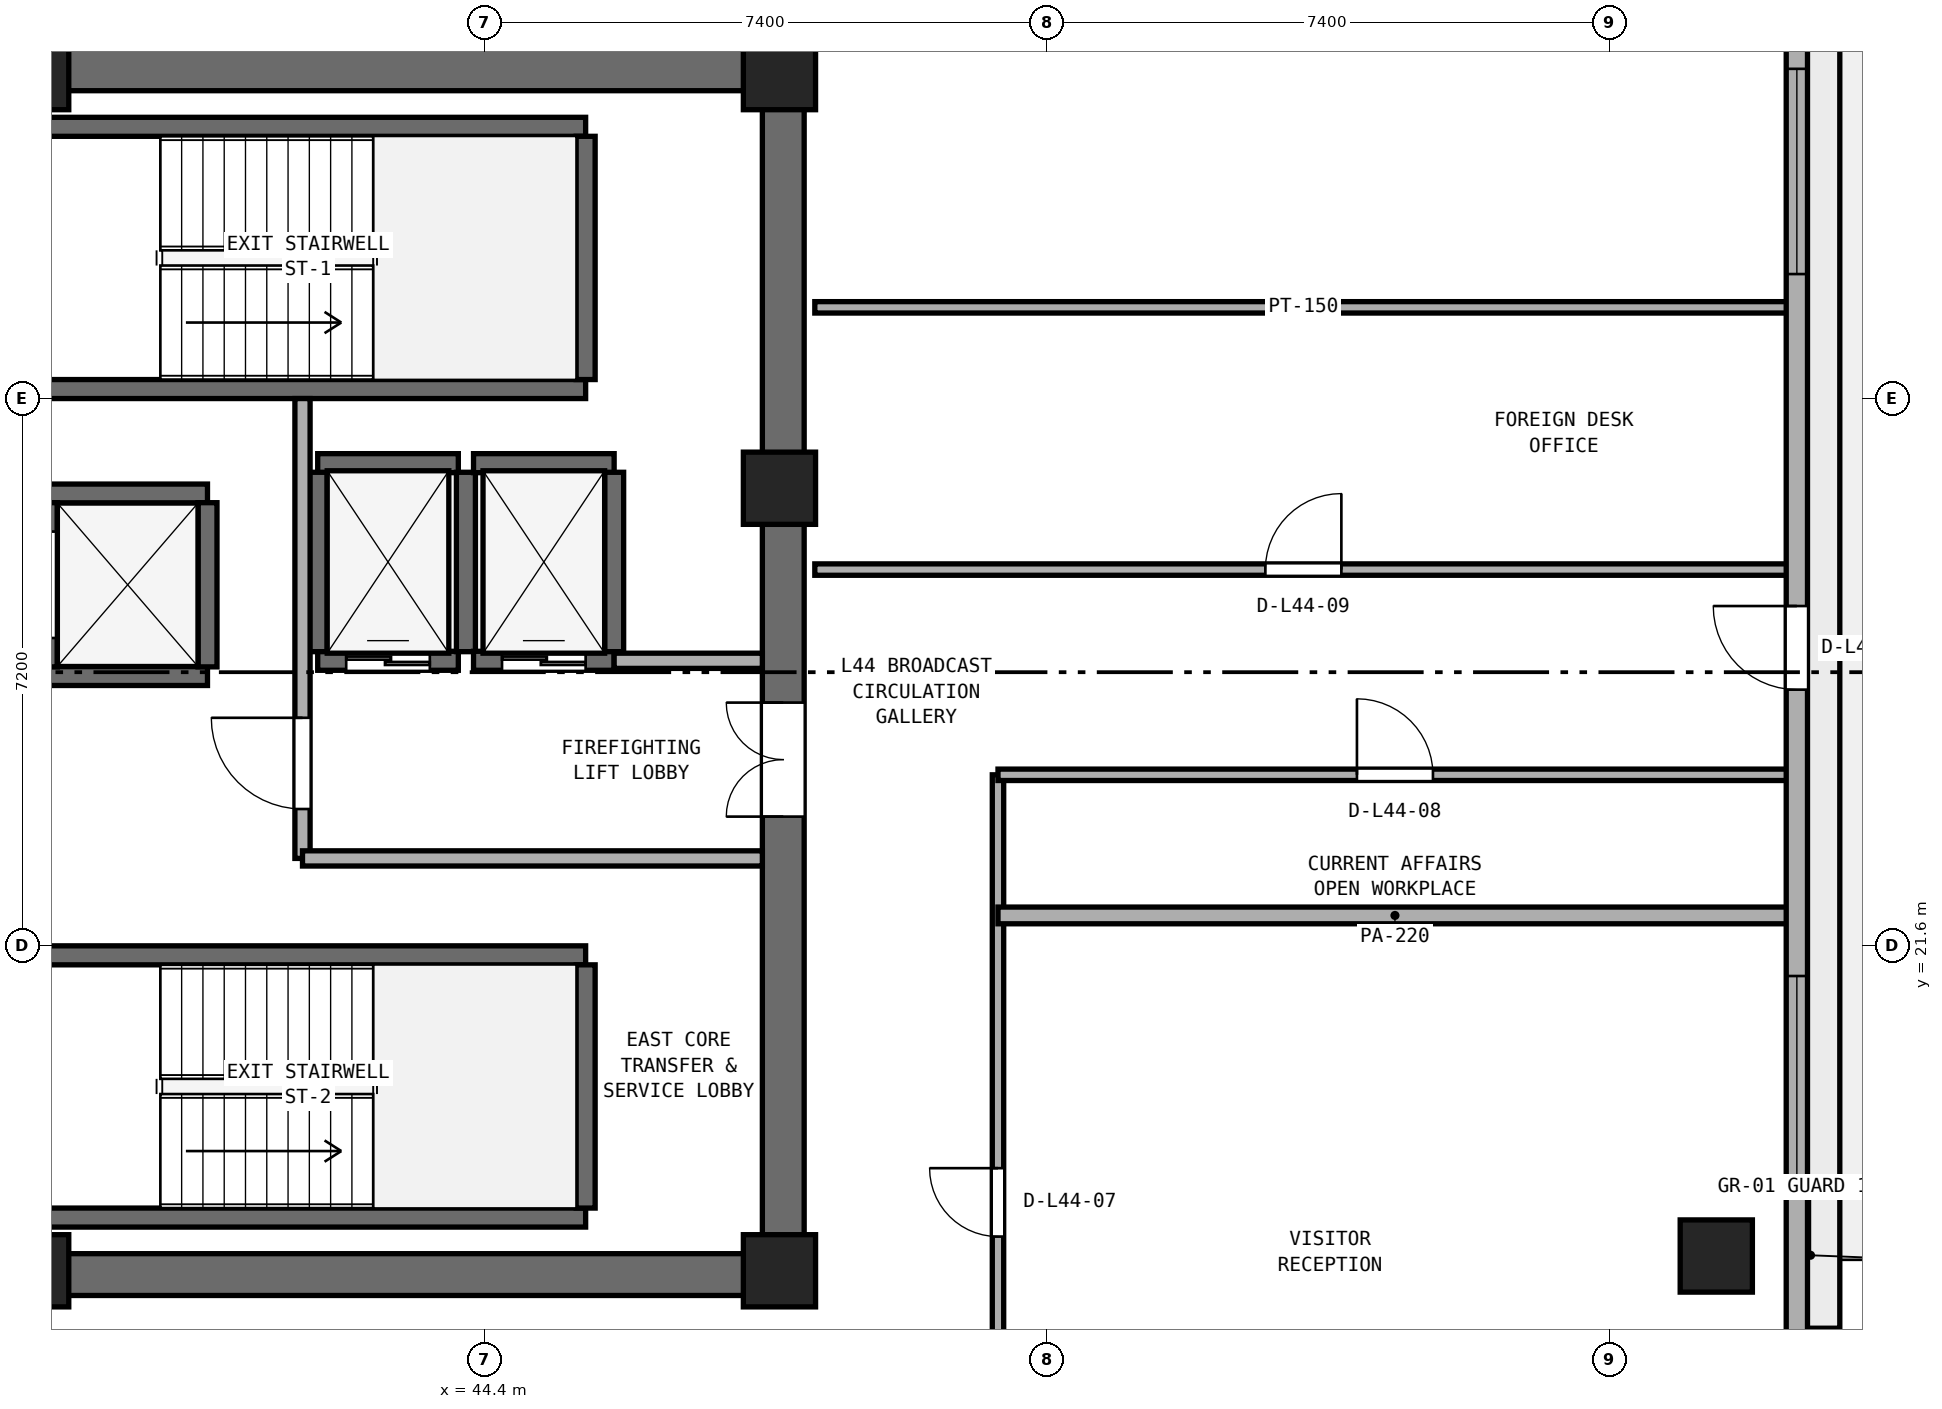
"""IFC4 building model, lengths in metres.
Left out: names, types, materials, properties, quantities, classifications, styles, units other than length and angle.
Written with IfcOpenShell. Run it as: python <this file> out.ifc"""

import sys

from ifc_helpers import new_model, si_unit, direction, frame, frame_2d, origin, origin_2d, place, context, subcontext, project, spatial, rectangle, extrude, element, fill, save


model = new_model("IFC4")
c1 = context("Model", 3, precision=1e-05, world=origin(), true_north=direction((0.0, 1.0)))
c2 = subcontext(c1, "Body", "Model", "MODEL_VIEW")
j1 = project(units=[si_unit("LENGTHUNIT", "METRE"), si_unit("PLANEANGLEUNIT", "RADIAN")], contexts=[c1])
p1 = place(None, origin())
s1 = spatial("IfcSite", under=j1, at=p1, CompositionType="ELEMENT")
p2 = place(p1, origin())
s2 = spatial("IfcBuilding", under=s1, at=p2, CompositionType="ELEMENT")
p3 = place(p2, frame((0.0, 0.0, 174.4)))
s3 = spatial("IfcBuildingStorey", under=s2, at=p3, CompositionType="ELEMENT", Elevation=174.4)
for number, where, z_axis, x_axis in (
    (1, (25.4, 17.275, 0.0), (0.0, 0.0, 1.0), (1.0, 0.0, 0.0)),
    (2, (25.4, 33.125, 0.0), (0.0, 0.0, 1.0), (1.0, 0.0, 0.0)),
):
    element("IfcWall", number, at=place(p3, frame(where, z_axis=z_axis, x_axis=x_axis)), inside=s3, PredefinedType="SHEAR", context=c2, shape_type="SweptSolid", body=[
        extrude(rectangle(XDim=23.2, YDim=0.55, at=frame_2d((11.6, 0.0))), origin(), (0.0, 0.0, 1.0), 3.54),
    ])
p4 = place(p3, frame((48.325, 17.55, 0.0), z_axis=(0.0, 0.0, 1.0), x_axis=(0.0, 1.0, 0.0)))
e3 = element("IfcWall", 3, at=p4, inside=s3, PredefinedType="SHEAR", context=c2, shape_type="SweptSolid", body=[
    extrude(rectangle(XDim=15.3, YDim=0.55, at=frame_2d((7.65, 0.0))), origin(), (0.0, 0.0, 1.0), 3.54),
])
p5 = place(p4, frame((5.75, 0.0, 0.0)))
e4 = element("IfcOpeningElement", 4, at=p5, cuts=e3, PredefinedType="OPENING", context=c2, shape_type="SweptSolid", body=[
    extrude(rectangle(XDim=1.5, YDim=2.15, at=frame_2d((0.75, 1.075))), frame((0.0, 0.285, 0.0), z_axis=(0.0, -1.0, 0.0), x_axis=(1.0, 0.0, 0.0)), (0.0, 0.0, 1.0), 0.57),
])
for number, where, z_axis, x_axis in (
    (5, (38.45, 17.325, 0.0), (0.0, 0.0, 1.0), (1.0, 0.0, 0.0)),
    (6, (48.275, 17.325, 0.0), (0.0, 0.0, 1.0), (1.0, 0.0, 0.0)),
    (7, (48.275, 27.62, 0.0), (0.0, 0.0, 1.0), (1.0, 0.0, 0.0)),
    (8, (48.275, 33.075, 0.0), (0.0, 0.0, 1.0), (1.0, 0.0, 0.0)),
    (9, (38.45, 33.075, 0.0), (0.0, 0.0, 1.0), (1.0, 0.0, 0.0)),
):
    element("IfcColumn", number, at=place(p3, frame(where, z_axis=z_axis, x_axis=x_axis)), inside=s3, PredefinedType="PILASTER", context=c2, shape_type="SweptSolid", body=[
        extrude(rectangle(XDim=0.95, YDim=0.95, at=origin_2d()), origin(), (0.0, 0.0, 1.0), 3.8),
    ])
p6 = place(p3, frame((60.6, 17.519, 0.0), z_axis=(0.0, 0.0, 1.0), x_axis=(1.0, 0.0, 0.0)))
e10 = element("IfcColumn", 10, at=p6, inside=s3, PredefinedType="COLUMN", context=c2, shape_type="SweptSolid", body=[
    extrude(rectangle(XDim=0.95, YDim=0.95, at=origin_2d()), origin(), (0.0, 0.0, 1.0), 3.8),
])
for number, where, z_axis, x_axis in (
    (11, (38.425, 28.925, 0.0), (0.0, 0.0, 1.0), (1.0, 0.0, 0.0)),
    (12, (38.425, 32.375, 0.0), (0.0, 0.0, 1.0), (1.0, 0.0, 0.0)),
):
    element("IfcWall", number, at=place(p3, frame(where, z_axis=z_axis, x_axis=x_axis)), inside=s3, PredefinedType="SHEAR", context=c2, shape_type="SweptSolid", body=[
        extrude(rectangle(XDim=7.3, YDim=0.25, at=frame_2d((3.65, 0.0))), origin(), (0.0, 0.0, 1.0), 3.54),
    ])
p7 = place(p3, frame((45.725, 29.05, 0.0), z_axis=(0.0, 0.0, 1.0), x_axis=(0.0, 1.0, 0.0)))
e13 = element("IfcWall", 13, at=p7, inside=s3, PredefinedType="SHEAR", context=c2, shape_type="SweptSolid", body=[
    extrude(rectangle(XDim=3.2, YDim=0.25, at=frame_2d((1.6, 0.0))), origin(), (0.0, 0.0, 1.0), 3.54),
])
for number, where, z_axis, x_axis in (
    (14, (38.425, 18.025, 0.0), (0.0, 0.0, 1.0), (1.0, 0.0, 0.0)),
    (15, (38.425, 21.475, 0.0), (0.0, 0.0, 1.0), (1.0, 0.0, 0.0)),
):
    element("IfcWall", number, at=place(p3, frame(where, z_axis=z_axis, x_axis=x_axis)), inside=s3, PredefinedType="SHEAR", context=c2, shape_type="SweptSolid", body=[
        extrude(rectangle(XDim=7.3, YDim=0.25, at=frame_2d((3.65, 0.0))), origin(), (0.0, 0.0, 1.0), 3.54),
    ])
p8 = place(p3, frame((45.725, 18.15, 0.0), z_axis=(0.0, 0.0, 1.0), x_axis=(0.0, 1.0, 0.0)))
e16 = element("IfcWall", 16, at=p8, inside=s3, PredefinedType="SHEAR", context=c2, shape_type="SweptSolid", body=[
    extrude(rectangle(XDim=3.2, YDim=0.25, at=frame_2d((1.6, 0.0))), origin(), (0.0, 0.0, 1.0), 3.54),
])
p9 = place(p3, frame((42.2, 25.35, 0.0), z_axis=(0.0, 0.0, 1.0), x_axis=(1.0, 0.0, 0.0)))
e17 = element("IfcWall", 17, at=p9, inside=s3, PredefinedType="SHEAR", context=c2, shape_type="SweptSolid", body=[
    extrude(rectangle(XDim=1.85, YDim=0.25, at=frame_2d((0.925, 0.0))), origin(), (0.0, 0.0, 1.0), 3.54),
])
p10 = place(p9, frame((0.375, 0.0, 0.0)))
e18 = element("IfcOpeningElement", 18, at=p10, cuts=e17, PredefinedType="OPENING", context=c2, shape_type="SweptSolid", body=[
    extrude(rectangle(XDim=1.1, YDim=2.15, at=frame_2d((0.55, 1.075))), frame((0.0, 0.135, 0.0), z_axis=(0.0, -1.0, 0.0), x_axis=(1.0, 0.0, 0.0)), (0.0, 0.0, 1.0), 0.27),
])
p11 = place(p3, frame((42.2, 27.95, 0.0), z_axis=(0.0, 0.0, 1.0), x_axis=(1.0, 0.0, 0.0)))
e19 = element("IfcWall", 19, at=p11, inside=s3, PredefinedType="SHEAR", context=c2, shape_type="SweptSolid", body=[
    extrude(rectangle(XDim=1.85, YDim=0.25, at=frame_2d((0.925, 0.0))), origin(), (0.0, 0.0, 1.0), 3.54),
])
for number, where, z_axis, x_axis in (
    (20, (42.2, 25.47, 0.0), (0.0, 0.0, 1.0), (0.0, 1.0, 0.0)),
    (21, (44.15, 25.47, 0.0), (0.0, 0.0, 1.0), (0.0, 1.0, 0.0)),
):
    element("IfcWall", number, at=place(p3, frame(where, z_axis=z_axis, x_axis=x_axis)), inside=s3, PredefinedType="SHEAR", context=c2, shape_type="SweptSolid", body=[
        extrude(rectangle(XDim=2.36, YDim=0.25, at=frame_2d((1.18, 0.0))), origin(), (0.0, 0.0, 1.0), 3.54),
    ])
p12 = place(p3, frame((44.25, 25.35, 0.0), z_axis=(0.0, 0.0, 1.0), x_axis=(1.0, 0.0, 0.0)))
e22 = element("IfcWall", 22, at=p12, inside=s3, PredefinedType="SHEAR", context=c2, shape_type="SweptSolid", body=[
    extrude(rectangle(XDim=1.85, YDim=0.25, at=frame_2d((0.925, 0.0))), origin(), (0.0, 0.0, 1.0), 3.54),
])
p13 = place(p12, frame((0.375, 0.0, 0.0)))
e23 = element("IfcOpeningElement", 23, at=p13, cuts=e22, PredefinedType="OPENING", context=c2, shape_type="SweptSolid", body=[
    extrude(rectangle(XDim=1.1, YDim=2.15, at=frame_2d((0.55, 1.075))), frame((0.0, 0.135, 0.0), z_axis=(0.0, -1.0, 0.0), x_axis=(1.0, 0.0, 0.0)), (0.0, 0.0, 1.0), 0.27),
])
p14 = place(p3, frame((44.25, 27.95, 0.0), z_axis=(0.0, 0.0, 1.0), x_axis=(1.0, 0.0, 0.0)))
e24 = element("IfcWall", 24, at=p14, inside=s3, PredefinedType="SHEAR", context=c2, shape_type="SweptSolid", body=[
    extrude(rectangle(XDim=1.85, YDim=0.25, at=frame_2d((0.925, 0.0))), origin(), (0.0, 0.0, 1.0), 3.54),
])
p15 = place(p3, frame((46.1, 25.47, 0.0), z_axis=(0.0, 0.0, 1.0), x_axis=(0.0, 1.0, 0.0)))
e25 = element("IfcWall", 25, at=p15, inside=s3, PredefinedType="SHEAR", context=c2, shape_type="SweptSolid", body=[
    extrude(rectangle(XDim=2.36, YDim=0.25, at=frame_2d((1.18, 0.0))), origin(), (0.0, 0.0, 1.0), 3.54),
])
for number, where, z_axis, x_axis in (
    (26, (38.65, 25.15, 0.0), (0.0, 0.0, 1.0), (1.0, 0.0, 0.0)),
    (27, (38.65, 27.55, 0.0), (0.0, 0.0, 1.0), (1.0, 0.0, 0.0)),
):
    element("IfcWall", number, at=place(p3, frame(where, z_axis=z_axis, x_axis=x_axis)), inside=s3, PredefinedType="SHEAR", context=c2, shape_type="SweptSolid", body=[
        extrude(rectangle(XDim=2.1, YDim=0.25, at=frame_2d((1.05, 0.0))), origin(), (0.0, 0.0, 1.0), 3.54),
    ])
p16 = place(p3, frame((38.65, 25.27, 0.0), z_axis=(0.0, 0.0, 1.0), x_axis=(0.0, 1.0, 0.0)))
e28 = element("IfcWall", 28, at=p16, inside=s3, PredefinedType="SHEAR", context=c2, shape_type="SweptSolid", body=[
    extrude(rectangle(XDim=2.16, YDim=0.25, at=frame_2d((1.08, 0.0))), origin(), (0.0, 0.0, 1.0), 3.54),
])
p17 = place(p16, frame((0.38, 0.0, 0.0)))
e29 = element("IfcOpeningElement", 29, at=p17, cuts=e28, PredefinedType="OPENING", context=c2, shape_type="SweptSolid", body=[
    extrude(rectangle(XDim=1.4, YDim=2.2, at=frame_2d((0.7, 1.1))), frame((0.0, 0.135, 0.0), z_axis=(0.0, -1.0, 0.0), x_axis=(1.0, 0.0, 0.0)), (0.0, 0.0, 1.0), 0.27),
])
p18 = place(p3, frame((40.75, 25.27, 0.0), z_axis=(0.0, 0.0, 1.0), x_axis=(0.0, 1.0, 0.0)))
e30 = element("IfcWall", 30, at=p18, inside=s3, PredefinedType="SHEAR", context=c2, shape_type="SweptSolid", body=[
    extrude(rectangle(XDim=2.16, YDim=0.25, at=frame_2d((1.08, 0.0))), origin(), (0.0, 0.0, 1.0), 3.54),
])
p19 = place(p3, frame((42.0, 22.75, 0.0), z_axis=(0.0, 0.0, 1.0), x_axis=(0.0, 1.0, 0.0)))
e31 = element("IfcWall", 31, at=p19, inside=s3, PredefinedType="SOLIDWALL", context=c2, shape_type="SweptSolid", body=[
    extrude(rectangle(XDim=6.05, YDim=0.2, at=frame_2d((3.025, 0.0))), origin(), (0.0, 0.0, 1.0), 3.54),
])
p20 = place(p19, frame((0.65, 0.0, 0.0)))
e32 = element("IfcOpeningElement", 32, at=p20, cuts=e31, PredefinedType="OPENING", context=c2, shape_type="SweptSolid", body=[
    extrude(rectangle(XDim=1.2, YDim=2.15, at=frame_2d((0.6, 1.075))), frame((0.0, 0.11, 0.0), z_axis=(0.0, -1.0, 0.0), x_axis=(1.0, 0.0, 0.0)), (0.0, 0.0, 1.0), 0.22),
])
p21 = place(p3, frame((42.0, 22.75, 0.0), z_axis=(0.0, 0.0, 1.0), x_axis=(1.0, 0.0, 0.0)))
e33 = element("IfcWall", 33, at=p21, inside=s3, PredefinedType="SOLIDWALL", context=c2, shape_type="SweptSolid", body=[
    extrude(rectangle(XDim=6.05, YDim=0.2, at=frame_2d((3.025, 0.0))), origin(), (0.0, 0.0, 1.0), 3.54),
])
p22 = place(p3, frame((46.1, 25.35, 0.0), z_axis=(0.0, 0.0, 1.0), x_axis=(1.0, 0.0, 0.0)))
e34 = element("IfcWall", 34, at=p22, inside=s3, PredefinedType="SOLIDWALL", context=c2, shape_type="SweptSolid", body=[
    extrude(rectangle(XDim=1.95, YDim=0.2, at=frame_2d((0.975, 0.0))), origin(), (0.0, 0.0, 1.0), 3.54),
])
p23 = place(p3, frame((51.15, 5.736, 0.0), z_axis=(0.0, 0.0, 1.0), x_axis=(0.0, 1.0, 0.0)))
e35 = element("IfcWall", 35, at=p23, inside=s3, PredefinedType="PARTITIONING", context=c2, shape_type="SweptSolid", body=[
    extrude(rectangle(XDim=18.114, YDim=0.15, at=frame_2d((9.057, 0.0))), origin(), (0.0, 0.0, 1.0), 3.54),
])
p24 = place(p23, frame((12.039, 0.0, 0.0)))
e36 = element("IfcOpeningElement", 36, at=p24, cuts=e35, PredefinedType="OPENING", context=c2, shape_type="SweptSolid", body=[
    extrude(rectangle(XDim=0.9, YDim=2.1, at=frame_2d((0.45, 1.05))), frame((0.0, 0.085, 0.0), z_axis=(0.0, -1.0, 0.0), x_axis=(1.0, 0.0, 0.0)), (0.0, 0.0, 1.0), 0.17),
])
p25 = place(p3, frame((51.15, 22.0, 0.0), z_axis=(0.0, 0.0, 1.0), x_axis=(1.0, 0.0, 0.0)))
e37 = element("IfcWall", 37, at=p25, inside=s3, PredefinedType="PARTITIONING", context=c2, shape_type="SweptSolid", body=[
    extrude(rectangle(XDim=10.445, YDim=0.22, at=frame_2d((5.223, 0.0))), origin(), (0.0, 0.0, 1.0), 3.54),
])
p26 = place(p3, frame((51.15, 23.85, 0.0), z_axis=(0.0, 0.0, 1.0), x_axis=(1.0, 0.0, 0.0)))
e38 = element("IfcWall", 38, at=p26, inside=s3, PredefinedType="PARTITIONING", context=c2, shape_type="SweptSolid", body=[
    extrude(rectangle(XDim=10.445, YDim=0.15, at=frame_2d((5.223, 0.0))), origin(), (0.0, 0.0, 1.0), 3.54),
])
p27 = place(p26, frame((4.722, 0.0, 0.0)))
e39 = element("IfcOpeningElement", 39, at=p27, cuts=e38, PredefinedType="OPENING", context=c2, shape_type="SweptSolid", body=[
    extrude(rectangle(XDim=1.0, YDim=2.12, at=frame_2d((0.5, 1.06))), frame((0.0, 0.085, 0.0), z_axis=(0.0, -1.0, 0.0), x_axis=(1.0, 0.0, 0.0)), (0.0, 0.0, 1.0), 0.17),
])
p28 = place(p3, frame((48.74, 26.55, 0.0), z_axis=(0.0, 0.0, 1.0), x_axis=(1.0, 0.0, 0.0)))
e40 = element("IfcWall", 40, at=p28, inside=s3, PredefinedType="PARTITIONING", context=c2, shape_type="SweptSolid", body=[
    extrude(rectangle(XDim=12.855, YDim=0.15, at=frame_2d((6.427, 0.0))), origin(), (0.0, 0.0, 1.0), 3.54),
])
p29 = place(p28, frame((5.927, 0.0, 0.0)))
e41 = element("IfcOpeningElement", 41, at=p29, cuts=e40, PredefinedType="OPENING", context=c2, shape_type="SweptSolid", body=[
    extrude(rectangle(XDim=1.0, YDim=2.12, at=frame_2d((0.5, 1.06))), frame((0.0, 0.085, 0.0), z_axis=(0.0, -1.0, 0.0), x_axis=(1.0, 0.0, 0.0)), (0.0, 0.0, 1.0), 0.17),
])
p30 = place(p3, frame((48.74, 30.0, 0.0), z_axis=(0.0, 0.0, 1.0), x_axis=(1.0, 0.0, 0.0)))
e42 = element("IfcWall", 42, at=p30, inside=s3, PredefinedType="PARTITIONING", context=c2, shape_type="SweptSolid", body=[
    extrude(rectangle(XDim=12.855, YDim=0.15, at=frame_2d((6.427, 0.0))), origin(), (0.0, 0.0, 1.0), 3.54),
])
p31 = place(p3, frame((61.66, 16.369, 0.0), z_axis=(0.0, 0.0, 1.0), x_axis=(0.0, 1.0, 0.0)))
e43 = element("IfcWall", 43, at=p31, inside=s3, PredefinedType="STANDARD", context=c2, shape_type="SweptSolid", body=[
    extrude(rectangle(XDim=18.902, YDim=0.28, at=frame_2d((9.451, 0.0))), origin(), (0.0, 0.0, 1.0), 3.54),
])
p32 = place(p31, frame((8.601, 0.0, 0.0)))
e44 = element("IfcOpeningElement", 44, at=p32, cuts=e43, PredefinedType="OPENING", context=c2, shape_type="SweptSolid", body=[
    extrude(rectangle(XDim=1.1, YDim=2.2, at=frame_2d((0.55, 1.1))), frame((0.0, 0.15, 0.0), z_axis=(0.0, -1.0, 0.0), x_axis=(1.0, 0.0, 0.0)), (0.0, 0.0, 1.0), 0.3),
])
p33 = place(p31, frame((2.134, 0.0, 0.9)))
e45 = element("IfcOpeningElement", 45, at=p33, cuts=e43, PredefinedType="OPENING", context=c2, shape_type="SweptSolid", body=[
    extrude(rectangle(XDim=2.7, YDim=1.75, at=frame_2d((1.35, 0.875))), frame((0.0, 0.15, 0.0), z_axis=(0.0, -1.0, 0.0), x_axis=(1.0, 0.0, 0.0)), (0.0, 0.0, 1.0), 0.3),
])
p34 = place(p31, frame((14.069, 0.0, 0.9)))
e46 = element("IfcOpeningElement", 46, at=p34, cuts=e43, PredefinedType="OPENING", context=c2, shape_type="SweptSolid", body=[
    extrude(rectangle(XDim=2.7, YDim=1.75, at=frame_2d((1.35, 0.875))), frame((0.0, 0.15, 0.0), z_axis=(0.0, -1.0, 0.0), x_axis=(1.0, 0.0, 0.0)), (0.0, 0.0, 1.0), 0.3),
])
p35 = place(p10, origin())
e47 = element("IfcDoor", 47, at=p35, inside=s3, OperationType="DOUBLE_DOOR_SLIDING", PredefinedType="DOOR", context=c2, shape_type="SweptSolid", body=[
    extrude(rectangle(XDim=1.1, YDim=2.15, at=frame_2d((0.55, 1.075))), frame((0.0, 0.025, 0.0), z_axis=(0.0, -1.0, 0.0), x_axis=(1.0, 0.0, 0.0)), (0.0, 0.0, 1.0), 0.05),
])
fill(e18, e47)
p36 = place(p13, origin())
e48 = element("IfcDoor", 48, at=p36, inside=s3, OperationType="DOUBLE_DOOR_SLIDING", PredefinedType="DOOR", context=c2, shape_type="SweptSolid", body=[
    extrude(rectangle(XDim=1.1, YDim=2.15, at=frame_2d((0.55, 1.075))), frame((0.0, 0.025, 0.0), z_axis=(0.0, -1.0, 0.0), x_axis=(1.0, 0.0, 0.0)), (0.0, 0.0, 1.0), 0.05),
])
fill(e23, e48)
p37 = place(p20, origin())
e49 = element("IfcDoor", 49, at=p37, inside=s3, OperationType="SINGLE_SWING_RIGHT", PredefinedType="DOOR", context=c2, shape_type="SweptSolid", body=[
    extrude(rectangle(XDim=1.2, YDim=2.15, at=frame_2d((0.6, 1.075))), frame((0.0, 0.025, 0.0), z_axis=(0.0, -1.0, 0.0), x_axis=(1.0, 0.0, 0.0)), (0.0, 0.0, 1.0), 0.05),
])
fill(e32, e49)
p38 = place(p5, origin())
e50 = element("IfcDoor", 50, at=p38, inside=s3, OperationType="DOUBLE_DOOR_SINGLE_SWING", PredefinedType="DOOR", context=c2, shape_type="SweptSolid", body=[
    extrude(rectangle(XDim=1.5, YDim=2.15, at=frame_2d((0.75, 1.075))), frame((0.0, 0.025, 0.0), z_axis=(0.0, -1.0, 0.0), x_axis=(1.0, 0.0, 0.0)), (0.0, 0.0, 1.0), 0.05),
])
fill(e4, e50)
p39 = place(p24, origin())
e51 = element("IfcDoor", 51, at=p39, inside=s3, OperationType="SINGLE_SWING_RIGHT", PredefinedType="DOOR", context=c2, shape_type="SweptSolid", body=[
    extrude(rectangle(XDim=0.9, YDim=2.1, at=frame_2d((0.45, 1.05))), frame((0.0, 0.025, 0.0), z_axis=(0.0, -1.0, 0.0), x_axis=(1.0, 0.0, 0.0)), (0.0, 0.0, 1.0), 0.05),
])
fill(e36, e51)
p40 = place(p27, origin())
e52 = element("IfcDoor", 52, at=p40, inside=s3, OperationType="SINGLE_SWING_LEFT", PredefinedType="DOOR", context=c2, shape_type="SweptSolid", body=[
    extrude(rectangle(XDim=1.0, YDim=2.12, at=frame_2d((0.5, 1.06))), frame((0.0, 0.025, 0.0), z_axis=(0.0, -1.0, 0.0), x_axis=(1.0, 0.0, 0.0)), (0.0, 0.0, 1.0), 0.05),
])
fill(e39, e52)
p41 = place(p29, origin())
e53 = element("IfcDoor", 53, at=p41, inside=s3, OperationType="SINGLE_SWING_RIGHT", PredefinedType="DOOR", context=c2, shape_type="SweptSolid", body=[
    extrude(rectangle(XDim=1.0, YDim=2.12, at=frame_2d((0.5, 1.06))), frame((0.0, 0.025, 0.0), z_axis=(0.0, -1.0, 0.0), x_axis=(1.0, 0.0, 0.0)), (0.0, 0.0, 1.0), 0.05),
])
fill(e41, e53)
p42 = place(p32, origin())
e54 = element("IfcDoor", 54, at=p42, inside=s3, OperationType="SINGLE_SWING_RIGHT", PredefinedType="DOOR", context=c2, shape_type="SweptSolid", body=[
    extrude(rectangle(XDim=1.1, YDim=2.2, at=frame_2d((0.55, 1.1))), frame((0.0, 0.025, 0.0), z_axis=(0.0, -1.0, 0.0), x_axis=(1.0, 0.0, 0.0)), (0.0, 0.0, 1.0), 0.05),
])
fill(e44, e54)
p43 = place(p33, origin())
e55 = element("IfcWindow", 55, at=p43, inside=s3, PartitioningType="SINGLE_PANEL", PredefinedType="WINDOW", context=c2, shape_type="SweptSolid", body=[
    extrude(rectangle(XDim=2.7, YDim=1.75, at=frame_2d((1.35, 0.875))), frame((0.0, 0.03, 0.0), z_axis=(0.0, -1.0, 0.0), x_axis=(1.0, 0.0, 0.0)), (0.0, 0.0, 1.0), 0.06),
])
fill(e45, e55)
p44 = place(p34, origin())
e56 = element("IfcWindow", 56, at=p44, inside=s3, PartitioningType="SINGLE_PANEL", PredefinedType="WINDOW", context=c2, shape_type="SweptSolid", body=[
    extrude(rectangle(XDim=2.7, YDim=1.75, at=frame_2d((1.35, 0.875))), frame((0.0, 0.03, 0.0), z_axis=(0.0, -1.0, 0.0), x_axis=(1.0, 0.0, 0.0)), (0.0, 0.0, 1.0), 0.06),
])
fill(e46, e56)
save(model, sys.argv[1])
